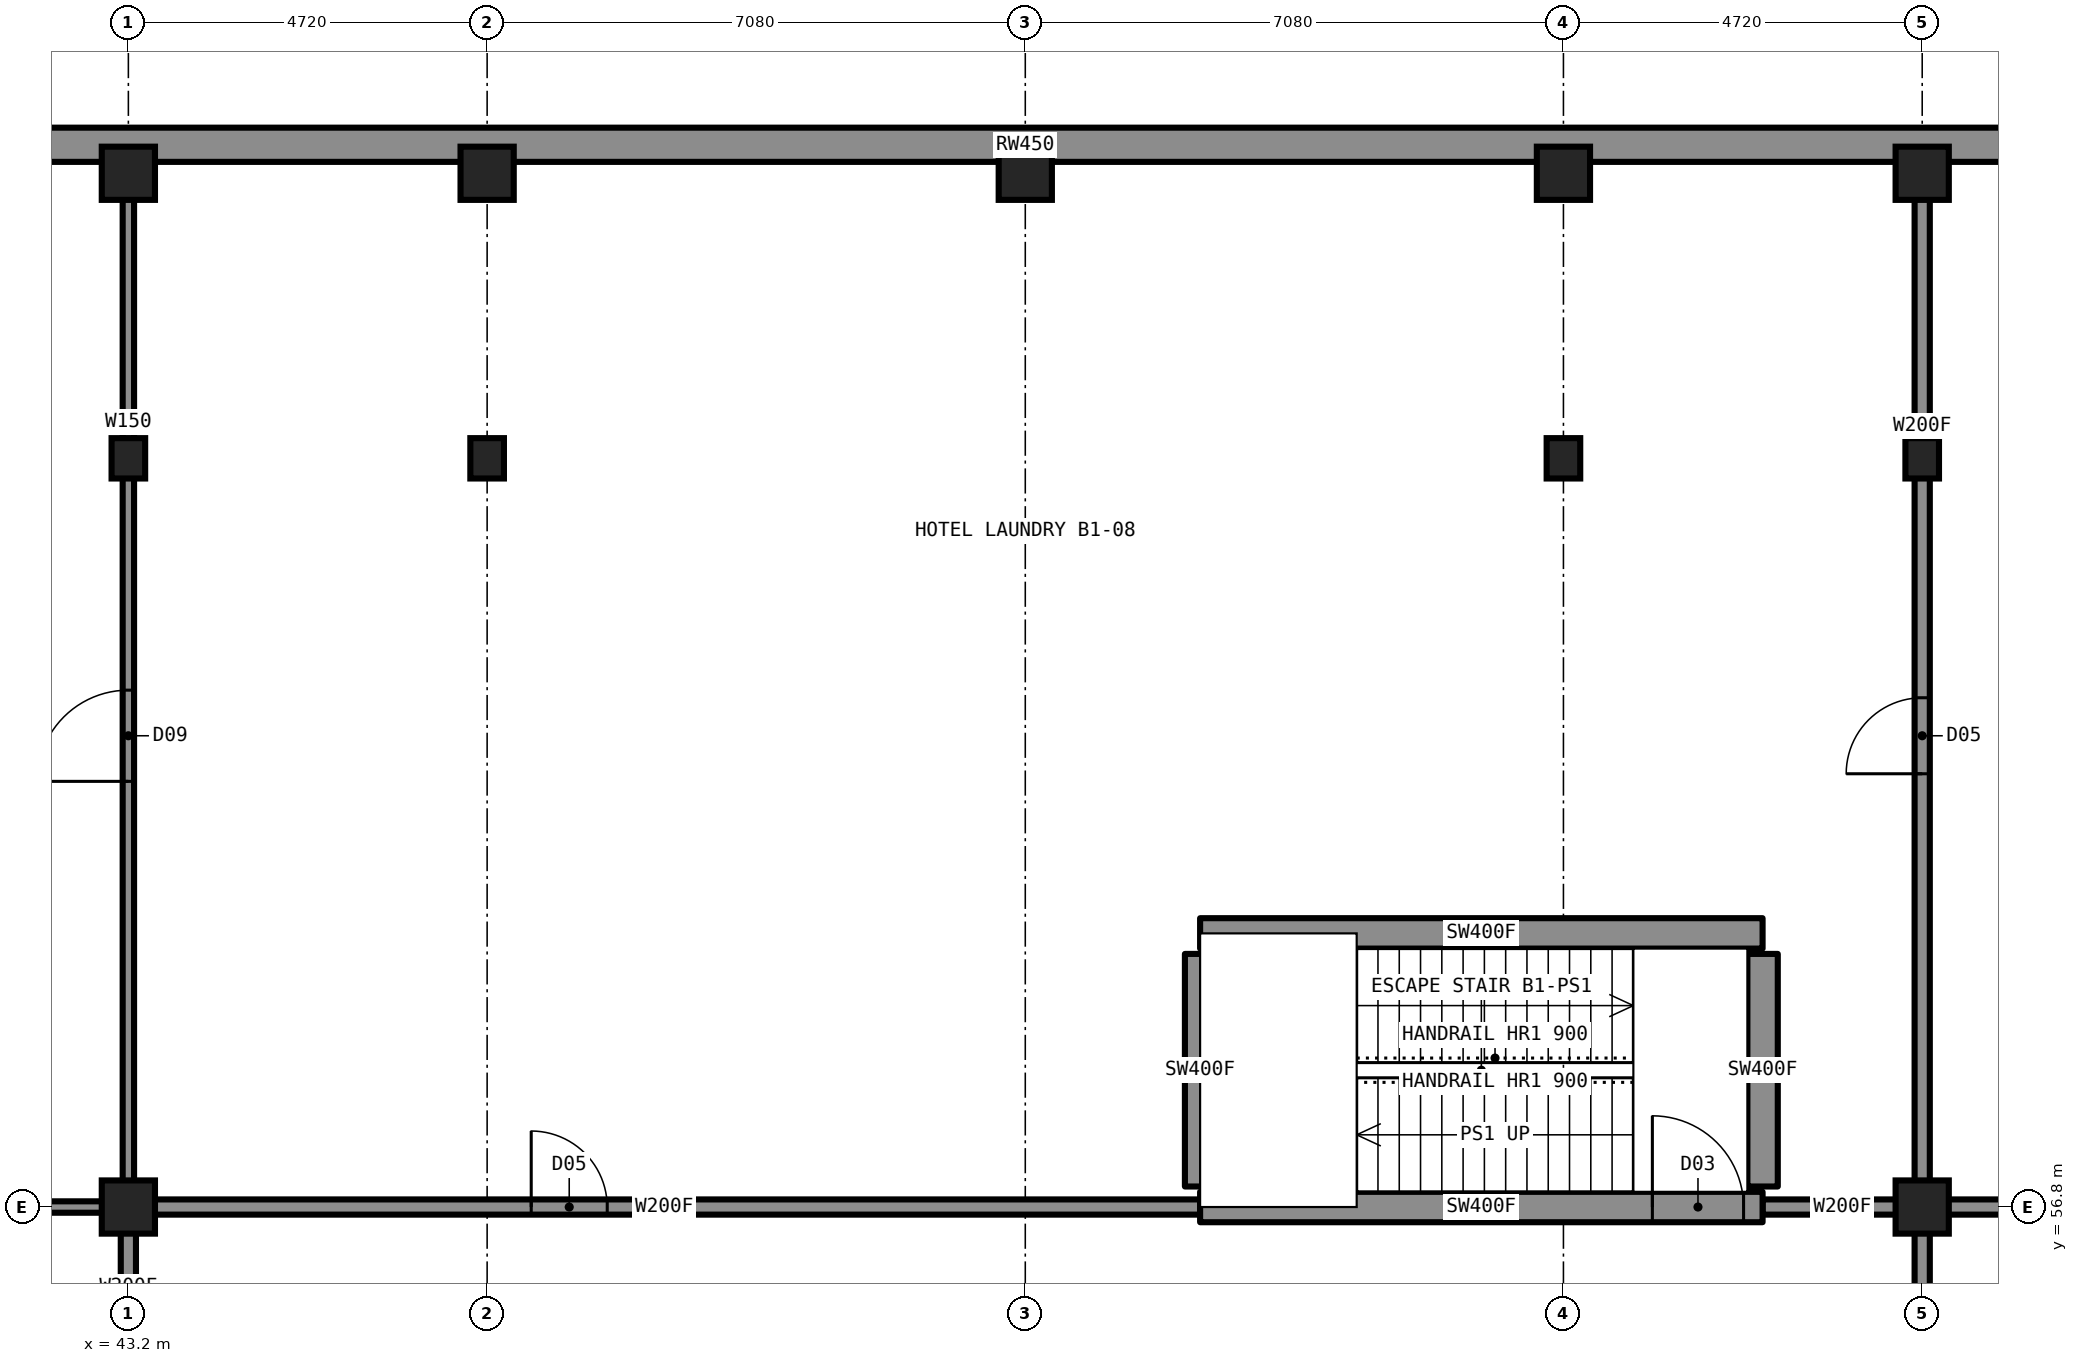
"""IFC4 building model, lengths in metres.
Left out: names, types, materials, properties, quantities, classifications, styles, units other than length and angle.
Written with IfcOpenShell. Run it as: python <this file> out.ifc"""

import sys

from ifc_helpers import new_model, si_unit, direction, frame, frame_2d, origin, origin_2d, place, context, subcontext, project, spatial, rectangle, hollow_rectangle, i_section, extrude, element, fill, save


model = new_model("IFC4")
c1 = context("Model", 3, precision=1e-05, world=origin(), true_north=direction((0.0, 1.0)))
c2 = subcontext(c1, "Body", "Model", "MODEL_VIEW")
j1 = project(units=[si_unit("LENGTHUNIT", "METRE"), si_unit("PLANEANGLEUNIT", "RADIAN")], contexts=[c1])
p1 = place(None, origin())
s1 = spatial("IfcSite", under=j1, at=p1, CompositionType="ELEMENT")
p2 = place(p1, origin())
s2 = spatial("IfcBuilding", under=s1, at=p2, CompositionType="ELEMENT")
p3 = place(p2, frame((0.0, 0.0, -5.0)))
s3 = spatial("IfcBuildingStorey", under=s2, at=p3, CompositionType="ELEMENT", Elevation=-5.0)
for number, where, z_axis, x_axis in (
    (1, (43.2, 66.65, 0.0), (0.0, 0.0, 1.0), (1.0, 0.0, 0.0)),
    (2, (47.92, 66.65, 0.0), (0.0, 0.0, 1.0), (1.0, 0.0, 0.0)),
    (3, (62.08, 66.65, 0.0), (0.0, 0.0, 1.0), (1.0, 0.0, 0.0)),
    (4, (66.8, 66.65, 0.0), (0.0, 0.0, 1.0), (1.0, 0.0, 0.0)),
):
    element("IfcColumn", number, at=place(p3, frame(where, z_axis=z_axis, x_axis=x_axis)), inside=s3, PredefinedType="COLUMN", context=c2, shape_type="SweptSolid", body=[
        extrude(i_section(OverallWidth=0.442, OverallDepth=0.531, WebThickness=0.066, FlangeThickness=0.106, at=origin_2d()), origin(), (0.0, 0.0, 1.0), 5.0),
    ])
for number, where, z_axis, x_axis in (
    (5, (43.2, 56.8, 0.0), (0.0, 0.0, 1.0), (1.0, 0.0, 0.0)),
    (6, (66.8, 56.8, 0.0), (0.0, 0.0, 1.0), (1.0, 0.0, 0.0)),
):
    element("IfcColumn", number, at=place(p3, frame(where, z_axis=z_axis, x_axis=x_axis)), inside=s3, PredefinedType="COLUMN", context=c2, shape_type="SweptSolid", body=[
        extrude(hollow_rectangle(XDim=0.7, YDim=0.7, WallThickness=0.06, at=origin_2d()), origin(), (0.0, 0.0, 1.0), 5.0),
    ])
for number, where, z_axis, x_axis in (
    (7, (43.2, 70.4, 0.0), (0.0, 0.0, 1.0), (1.0, 0.0, 0.0)),
    (8, (47.92, 70.4, 0.0), (0.0, 0.0, 1.0), (1.0, 0.0, 0.0)),
    (9, (55.0, 70.4, 0.0), (0.0, 0.0, 1.0), (1.0, 0.0, 0.0)),
    (10, (62.08, 70.4, 0.0), (0.0, 0.0, 1.0), (1.0, 0.0, 0.0)),
    (11, (66.8, 70.4, 0.0), (0.0, 0.0, 1.0), (1.0, 0.0, 0.0)),
):
    element("IfcColumn", number, at=place(p3, frame(where, z_axis=z_axis, x_axis=x_axis)), inside=s3, PredefinedType="COLUMN", context=c2, shape_type="SweptSolid", body=[
        extrude(rectangle(XDim=0.7, YDim=0.7, at=origin_2d()), origin(), (0.0, 0.0, 1.0), 5.0),
    ])
p4 = place(p3, frame((23.0, 70.775, 0.0), z_axis=(0.0, 0.0, 1.0), x_axis=(1.0, 0.0, 0.0)))
e12 = element("IfcWall", 12, at=p4, inside=s3, PredefinedType="SOLIDWALL", context=c2, shape_type="SweptSolid", body=[
    extrude(rectangle(XDim=64.0, YDim=0.45, at=frame_2d((32.0, 0.0))), origin(), (0.0, 0.0, 1.0), 5.0),
])
p5 = place(p3, frame((43.2, 56.8, 0.0), z_axis=(0.0, 0.0, 1.0), x_axis=(1.0, 0.0, 0.0)))
e13 = element("IfcWall", 13, at=p5, inside=s3, PredefinedType="PARTITIONING", context=c2, shape_type="SweptSolid", body=[
    extrude(rectangle(XDim=14.1, YDim=0.2, at=frame_2d((7.05, 0.0))), origin(), (0.0, 0.0, 1.0), 4.6),
])
p6 = place(p5, frame((5.3, 0.0, 0.0)))
e14 = element("IfcOpeningElement", 14, at=p6, cuts=e13, PredefinedType="OPENING", context=c2, shape_type="SweptSolid", body=[
    extrude(rectangle(XDim=1.0, YDim=2.1, at=frame_2d((0.5, 1.05))), frame((0.0, 0.11, 0.0), z_axis=(0.0, -1.0, 0.0), x_axis=(1.0, 0.0, 0.0)), (0.0, 0.0, 1.0), 0.22),
])
p7 = place(p3, frame((64.7, 56.8, 0.0), z_axis=(0.0, 0.0, 1.0), x_axis=(1.0, 0.0, 0.0)))
e15 = element("IfcWall", 15, at=p7, inside=s3, PredefinedType="PARTITIONING", context=c2, shape_type="SweptSolid", body=[
    extrude(rectangle(XDim=2.1, YDim=0.2, at=frame_2d((1.05, 0.0))), origin(), (0.0, 0.0, 1.0), 4.6),
])
p8 = place(p3, frame((66.8, 56.8, 0.0), z_axis=(0.0, 0.0, 1.0), x_axis=(1.0, 0.0, 0.0)))
e16 = element("IfcWall", 16, at=p8, inside=s3, PredefinedType="PARTITIONING", context=c2, shape_type="SweptSolid", body=[
    extrude(rectangle(XDim=19.75, YDim=0.2, at=frame_2d((9.875, 0.0))), origin(), (0.0, 0.0, 1.0), 4.6),
])
p9 = place(p3, frame((23.45, 56.8, 0.0), z_axis=(0.0, 0.0, 1.0), x_axis=(1.0, 0.0, 0.0)))
e17 = element("IfcWall", 17, at=p9, inside=s3, PredefinedType="PARTITIONING", context=c2, shape_type="SweptSolid", body=[
    extrude(rectangle(XDim=19.75, YDim=0.15, at=frame_2d((9.875, 0.0))), origin(), (0.0, 0.0, 1.0), 4.6),
])
p10 = place(p3, frame((57.3, 56.8, 0.0), z_axis=(0.0, 0.0, 1.0), x_axis=(1.0, 0.0, 0.0)))
e18 = element("IfcWall", 18, at=p10, inside=s3, PredefinedType="SHEAR", context=c2, shape_type="SweptSolid", body=[
    extrude(rectangle(XDim=7.4, YDim=0.4, at=frame_2d((3.7, 0.0))), origin(), (0.0, 0.0, 1.0), 5.0),
])
p11 = place(p10, frame((5.95, 0.0, 0.0)))
e19 = element("IfcOpeningElement", 19, at=p11, cuts=e18, PredefinedType="OPENING", context=c2, shape_type="SweptSolid", body=[
    extrude(rectangle(XDim=1.2, YDim=2.2, at=frame_2d((0.6, 1.1))), frame((0.0, 0.21, 0.0), z_axis=(0.0, -1.0, 0.0), x_axis=(1.0, 0.0, 0.0)), (0.0, 0.0, 1.0), 0.42),
])
p12 = place(p3, frame((57.3, 60.4, 0.0), z_axis=(0.0, 0.0, 1.0), x_axis=(1.0, 0.0, 0.0)))
e20 = element("IfcWall", 20, at=p12, inside=s3, PredefinedType="SHEAR", context=c2, shape_type="SweptSolid", body=[
    extrude(rectangle(XDim=7.4, YDim=0.4, at=frame_2d((3.7, 0.0))), origin(), (0.0, 0.0, 1.0), 5.0),
])
p13 = place(p3, frame((43.2, 54.7, 0.0), z_axis=(0.0, 0.0, 1.0), x_axis=(0.0, 1.0, 0.0)))
e21 = element("IfcWall", 21, at=p13, inside=s3, PredefinedType="PARTITIONING", context=c2, shape_type="SweptSolid", body=[
    extrude(rectangle(XDim=2.1, YDim=0.2, at=frame_2d((1.05, 0.0))), origin(), (0.0, 0.0, 1.0), 4.6),
])
p14 = place(p3, frame((43.2, 56.8, 0.0), z_axis=(0.0, 0.0, 1.0), x_axis=(0.0, 1.0, 0.0)))
e22 = element("IfcWall", 22, at=p14, inside=s3, PredefinedType="PARTITIONING", context=c2, shape_type="SweptSolid", body=[
    extrude(rectangle(XDim=13.75, YDim=0.15, at=frame_2d((6.875, 0.0))), origin(), (0.0, 0.0, 1.0), 4.6),
])
p15 = place(p14, frame((5.6, 0.0, 0.0)))
e23 = element("IfcOpeningElement", 23, at=p15, cuts=e22, PredefinedType="OPENING", context=c2, shape_type="SweptSolid", body=[
    extrude(rectangle(XDim=1.2, YDim=2.2, at=frame_2d((0.6, 1.1))), frame((0.0, 0.085, 0.0), z_axis=(0.0, -1.0, 0.0), x_axis=(1.0, 0.0, 0.0)), (0.0, 0.0, 1.0), 0.17),
])
p16 = place(p3, frame((66.8, 42.7, 0.0), z_axis=(0.0, 0.0, 1.0), x_axis=(0.0, 1.0, 0.0)))
e24 = element("IfcWall", 24, at=p16, inside=s3, PredefinedType="PARTITIONING", context=c2, shape_type="SweptSolid", body=[
    extrude(rectangle(XDim=14.1, YDim=0.2, at=frame_2d((7.05, 0.0))), origin(), (0.0, 0.0, 1.0), 4.6),
])
p17 = place(p16, frame((7.8, 0.0, 0.0)))
e25 = element("IfcOpeningElement", 25, at=p17, cuts=e24, PredefinedType="OPENING", context=c2, shape_type="SweptSolid", body=[
    extrude(rectangle(XDim=1.0, YDim=2.1, at=frame_2d((0.5, 1.05))), frame((0.0, 0.11, 0.0), z_axis=(0.0, -1.0, 0.0), x_axis=(1.0, 0.0, 0.0)), (0.0, 0.0, 1.0), 0.22),
])
p18 = place(p3, frame((66.8, 56.8, 0.0), z_axis=(0.0, 0.0, 1.0), x_axis=(0.0, 1.0, 0.0)))
e26 = element("IfcWall", 26, at=p18, inside=s3, PredefinedType="PARTITIONING", context=c2, shape_type="SweptSolid", body=[
    extrude(rectangle(XDim=13.75, YDim=0.2, at=frame_2d((6.875, 0.0))), origin(), (0.0, 0.0, 1.0), 4.6),
])
p19 = place(p18, frame((5.7, 0.0, 0.0)))
e27 = element("IfcOpeningElement", 27, at=p19, cuts=e26, PredefinedType="OPENING", context=c2, shape_type="SweptSolid", body=[
    extrude(rectangle(XDim=1.0, YDim=2.1, at=frame_2d((0.5, 1.05))), frame((0.0, 0.11, 0.0), z_axis=(0.0, -1.0, 0.0), x_axis=(1.0, 0.0, 0.0)), (0.0, 0.0, 1.0), 0.22),
])
for number, where, z_axis, x_axis in (
    (28, (57.3, 57.07, 0.0), (0.0, 0.0, 1.0), (0.0, 1.0, 0.0)),
    (29, (64.7, 57.07, 0.0), (0.0, 0.0, 1.0), (0.0, 1.0, 0.0)),
):
    element("IfcWall", number, at=place(p3, frame(where, z_axis=z_axis, x_axis=x_axis)), inside=s3, PredefinedType="SHEAR", context=c2, shape_type="SweptSolid", body=[
        extrude(rectangle(XDim=3.06, YDim=0.4, at=frame_2d((1.53, 0.0))), origin(), (0.0, 0.0, 1.0), 5.0),
    ])
p20 = place(p11, origin())
e30 = element("IfcDoor", 30, at=p20, inside=s3, OperationType="SINGLE_SWING_LEFT", PredefinedType="DOOR", context=c2, shape_type="SweptSolid", body=[
    extrude(rectangle(XDim=1.2, YDim=2.2, at=frame_2d((0.6, 1.1))), frame((0.0, 0.025, 0.0), z_axis=(0.0, -1.0, 0.0), x_axis=(1.0, 0.0, 0.0)), (0.0, 0.0, 1.0), 0.05),
])
fill(e19, e30)
p21 = place(p19, origin())
e31 = element("IfcDoor", 31, at=p21, inside=s3, OperationType="SINGLE_SWING_LEFT", PredefinedType="DOOR", context=c2, shape_type="SweptSolid", body=[
    extrude(rectangle(XDim=1.0, YDim=2.1, at=frame_2d((0.5, 1.05))), frame((0.0, 0.025, 0.0), z_axis=(0.0, -1.0, 0.0), x_axis=(1.0, 0.0, 0.0)), (0.0, 0.0, 1.0), 0.05),
])
fill(e27, e31)
p22 = place(p6, origin())
e32 = element("IfcDoor", 32, at=p22, inside=s3, OperationType="SINGLE_SWING_LEFT", PredefinedType="DOOR", context=c2, shape_type="SweptSolid", body=[
    extrude(rectangle(XDim=1.0, YDim=2.1, at=frame_2d((0.5, 1.05))), frame((0.0, 0.025, 0.0), z_axis=(0.0, -1.0, 0.0), x_axis=(1.0, 0.0, 0.0)), (0.0, 0.0, 1.0), 0.05),
])
fill(e14, e32)
p23 = place(p15, origin())
e33 = element("IfcDoor", 33, at=p23, inside=s3, OperationType="SINGLE_SWING_LEFT", PredefinedType="DOOR", context=c2, shape_type="SweptSolid", body=[
    extrude(rectangle(XDim=1.2, YDim=2.2, at=frame_2d((0.6, 1.1))), frame((0.0, 0.025, 0.0), z_axis=(0.0, -1.0, 0.0), x_axis=(1.0, 0.0, 0.0)), (0.0, 0.0, 1.0), 0.05),
])
fill(e23, e33)
save(model, sys.argv[1])
